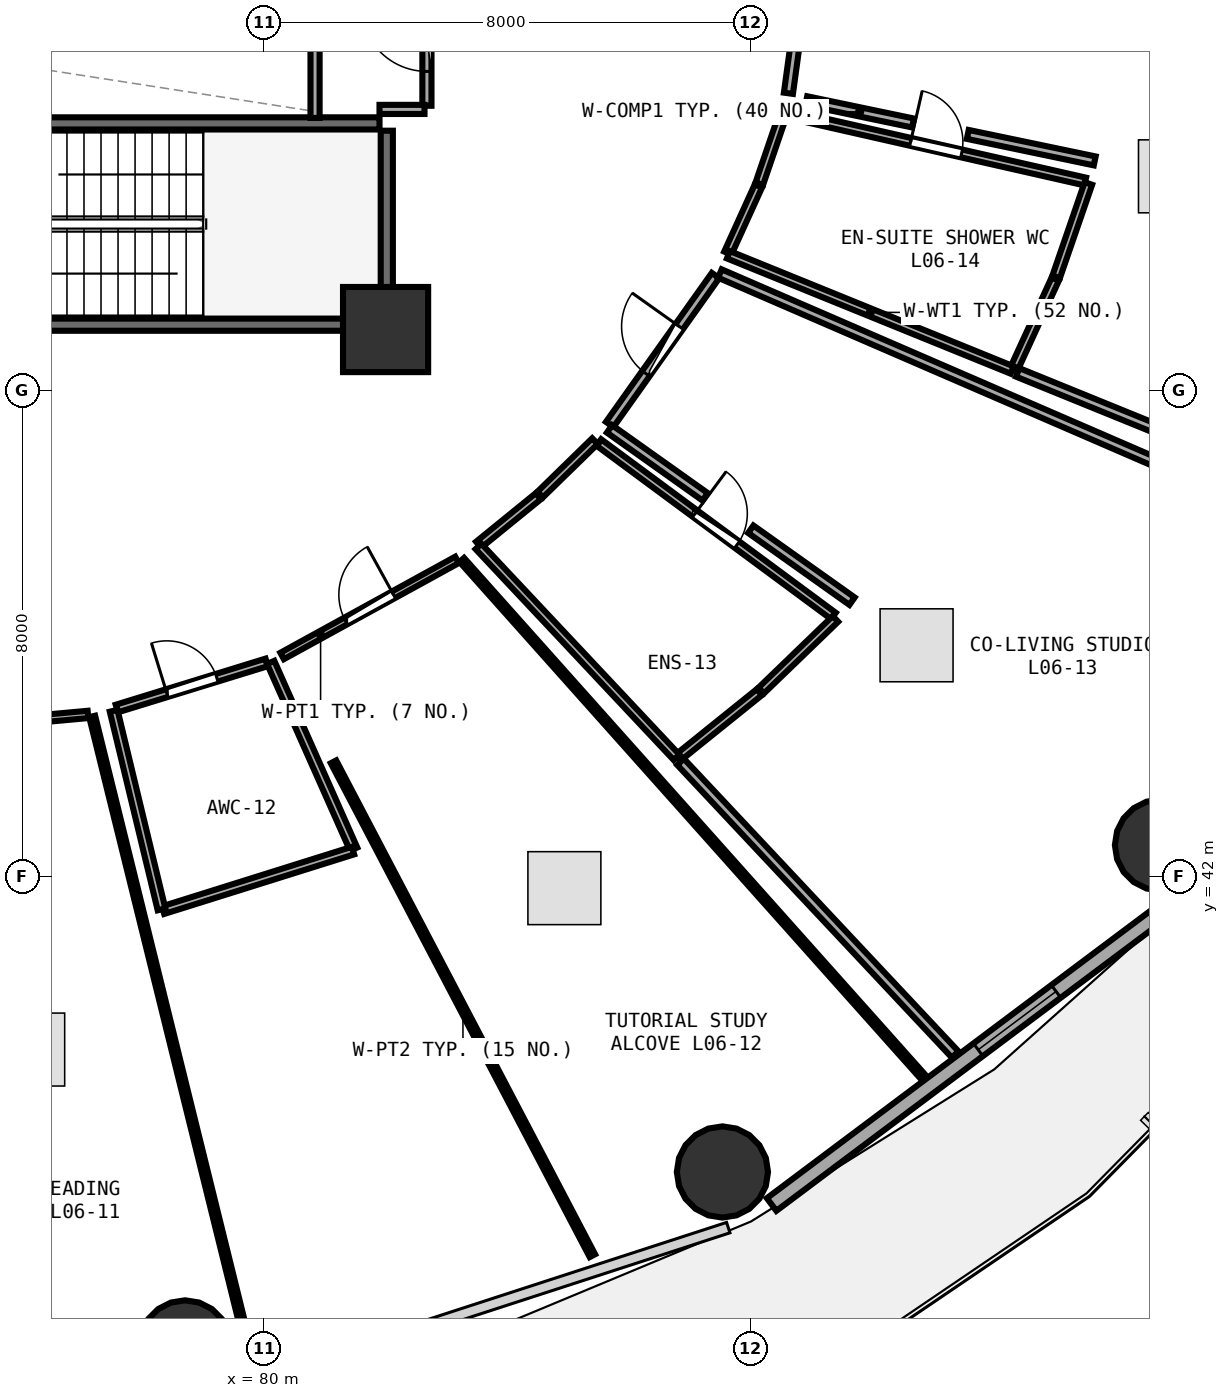
"""IFC4 building model, lengths in metres.
Left out: names, types, materials, properties, quantities, classifications, styles, units other than length and angle.
Written with IfcOpenShell. Run it as: python <this file> out.ifc"""

import sys

from ifc_helpers import new_model, si_unit, direction, frame, frame_2d, origin, origin_2d, place, context, subcontext, project, spatial, rectangle, circle, extrude, element, fill, save


model = new_model("IFC4")
c1 = context("Model", 3, precision=1e-05, world=origin(), true_north=direction((0.0, 1.0)))
c2 = subcontext(c1, "Body", "Model", "MODEL_VIEW")
j1 = project(units=[si_unit("LENGTHUNIT", "METRE"), si_unit("PLANEANGLEUNIT", "RADIAN")], contexts=[c1])
p1 = place(None, origin())
s1 = spatial("IfcSite", under=j1, at=p1, CompositionType="ELEMENT")
p2 = place(p1, origin())
s2 = spatial("IfcBuilding", under=s1, at=p2, CompositionType="ELEMENT")
p3 = place(p2, frame((0.0, 0.0, 26.25)))
s3 = spatial("IfcBuildingStorey", under=s2, at=p3, CompositionType="ELEMENT", Elevation=26.25)
p4 = place(p3, frame((82.0, 51.0, 0.0), z_axis=(0.0, 0.0, 1.0), x_axis=(1.0, 0.0, 0.0)))
e1 = element("IfcColumn", 1, at=p4, inside=s3, PredefinedType="PILASTER", context=c2, shape_type="SweptSolid", body=[
    extrude(rectangle(XDim=1.4, YDim=1.4, at=origin_2d()), origin(), (0.0, 0.0, 1.0), 3.75),
])
for number, where, z_axis, x_axis in (
    (2, (78.702, 34.286, 0.0), (0.0, 0.0, 1.0), (1.0, 0.0, 0.0)),
    (3, (87.54, 37.146, 0.0), (0.0, 0.0, 1.0), (1.0, 0.0, 0.0)),
    (4, (94.744, 42.522, 0.0), (0.0, 0.0, 1.0), (1.0, 0.0, 0.0)),
):
    element("IfcColumn", number, at=place(p3, frame(where, z_axis=z_axis, x_axis=x_axis)), inside=s3, PredefinedType="COLUMN", context=c2, shape_type="SweptSolid", body=[
        extrude(circle(Radius=0.75, at=origin_2d()), origin(), (0.0, 0.0, 1.0), 3.75),
    ])
p5 = place(p3, frame((88.349, 36.611, 0.0), z_axis=(0.0, 0.0, 1.0), x_axis=(0.80030733173, 0.599590005569, 0.0)))
e5 = element("IfcWall", 5, at=p5, inside=s3, PredefinedType="SOLIDWALL", context=c2, shape_type="SweptSolid", body=[
    extrude(rectangle(XDim=8.291, YDim=0.26, at=frame_2d((4.145, 0.0))), origin(), (0.0, 0.0, 1.0), 3.475),
])
p6 = place(p5, frame((4.245, 0.0, 0.85)))
e6 = element("IfcOpeningElement", 6, at=p6, cuts=e5, PredefinedType="OPENING", context=c2, shape_type="SweptSolid", body=[
    extrude(rectangle(XDim=1.6, YDim=1.45, at=frame_2d((0.8, 0.725))), frame((0.0, 0.14, 0.0), z_axis=(0.0, -1.0, 0.0), x_axis=(1.0, 0.0, 0.0)), (0.0, 0.0, 1.0), 0.28),
])
p7 = place(p3, frame((74.0, 51.08, 0.0), z_axis=(0.0, 0.0, 1.0), x_axis=(1.0, 0.0, 0.0)))
e7 = element("IfcWall", 7, at=p7, inside=s3, PredefinedType="SHEAR", context=c2, shape_type="SweptSolid", body=[
    extrude(rectangle(XDim=7.9, YDim=0.2, at=frame_2d((3.95, 0.0))), origin(), (0.0, 0.0, 1.0), 3.49),
])
p8 = place(p7, frame((1.12, 0.0, 0.0)))
e8 = element("IfcOpeningElement", 8, at=p8, cuts=e7, PredefinedType="OPENING", context=c2, shape_type="SweptSolid", body=[
    extrude(rectangle(XDim=1.05, YDim=2.1, at=frame_2d((0.525, 1.05))), frame((0.0, 0.11, 0.0), z_axis=(0.0, -1.0, 0.0), x_axis=(1.0, 0.0, 0.0)), (0.0, 0.0, 1.0), 0.22),
])
p9 = place(p3, frame((82.02, 51.2, 0.0), z_axis=(0.0, 0.0, 1.0), x_axis=(0.0, 1.0, 0.0)))
e9 = element("IfcWall", 9, at=p9, inside=s3, PredefinedType="SHEAR", context=c2, shape_type="SweptSolid", body=[
    extrude(rectangle(XDim=3.07, YDim=0.2, at=frame_2d((1.535, 0.0))), origin(), (0.0, 0.0, 1.0), 3.49),
])
p10 = place(p3, frame((81.9, 54.39, 0.0), z_axis=(0.0, 0.0, 1.0), x_axis=(-1.0, 0.0, 0.0)))
e10 = element("IfcWall", 10, at=p10, inside=s3, PredefinedType="SHEAR", context=c2, shape_type="SweptSolid", body=[
    extrude(rectangle(XDim=8.46, YDim=0.2, at=frame_2d((4.23, 0.0))), origin(), (0.0, 0.0, 1.0), 3.49),
])
p11 = place(p3, frame((80.84, 54.48, 0.0), z_axis=(0.0, 0.0, 1.0), x_axis=(0.0, 1.0, 0.0)))
e11 = element("IfcWall", 11, at=p11, inside=s3, PredefinedType="PARTITIONING", context=c2, shape_type="SweptSolid", body=[
    extrude(rectangle(XDim=2.29, YDim=0.15, at=frame_2d((1.145, 0.0))), origin(), (0.0, 0.0, 1.0), 3.48),
])
p12 = place(p3, frame((82.68, 54.68, 0.0), z_axis=(0.0, 0.0, 1.0), x_axis=(0.0, 1.0, 0.0)))
e12 = element("IfcWall", 12, at=p12, inside=s3, PredefinedType="PARTITIONING", context=c2, shape_type="SweptSolid", body=[
    extrude(rectangle(XDim=2.21, YDim=0.15, at=frame_2d((1.105, 0.0))), origin(), (0.0, 0.0, 1.0), 3.48),
])
p13 = place(p12, frame((0.565, 0.0, 0.0)))
e13 = element("IfcOpeningElement", 13, at=p13, cuts=e12, PredefinedType="OPENING", context=c2, shape_type="SweptSolid", body=[
    extrude(rectangle(XDim=1.08, YDim=2.1, at=frame_2d((0.54, 1.05))), frame((0.0, 0.085, 0.0), z_axis=(0.0, -1.0, 0.0), x_axis=(1.0, 0.0, 0.0)), (0.0, 0.0, 1.0), 0.17),
])
p14 = place(p3, frame((73.897, 44.376, 0.0), z_axis=(0.0, 0.0, 1.0), x_axis=(0.995829610124, 0.091232601628, 0.0)))
e14 = element("IfcWall", 14, at=p14, inside=s3, PredefinedType="PARTITIONING", context=c2, shape_type="SweptSolid", body=[
    extrude(rectangle(XDim=3.222, YDim=0.12, at=frame_2d((1.611, 0.0))), origin(), (0.0, 0.0, 1.0), 3.235),
])
p15 = place(p14, frame((1.161, 0.0, 0.0)))
e15 = element("IfcOpeningElement", 15, at=p15, cuts=e14, PredefinedType="OPENING", context=c2, shape_type="SweptSolid", body=[
    extrude(rectangle(XDim=0.9, YDim=2.08, at=frame_2d((0.45, 1.04))), frame((0.0, 0.07, 0.0), z_axis=(0.0, -1.0, 0.0), x_axis=(1.0, 0.0, 0.0)), (0.0, 0.0, 1.0), 0.14),
])
p16 = place(p3, frame((77.58, 44.768, 0.0), z_axis=(0.0, 0.0, 1.0), x_axis=(0.955754448098, 0.294165659011, 0.0)))
e16 = element("IfcWall", 16, at=p16, inside=s3, PredefinedType="PLUMBINGWALL", context=c2, shape_type="SweptSolid", body=[
    extrude(rectangle(XDim=2.579, YDim=0.13, at=frame_2d((1.29, 0.0))), origin(), (0.0, 0.0, 1.0), 3.235),
])
p17 = place(p16, frame((0.86, 0.0, 0.0)))
e17 = element("IfcOpeningElement", 17, at=p17, cuts=e16, PredefinedType="OPENING", context=c2, shape_type="SweptSolid", body=[
    extrude(rectangle(XDim=0.86, YDim=2.05, at=frame_2d((0.43, 1.025))), frame((0.0, 0.075, 0.0), z_axis=(0.0, -1.0, 0.0), x_axis=(1.0, 0.0, 0.0)), (0.0, 0.0, 1.0), 0.15),
])
p18 = place(p3, frame((80.299, 45.632, 0.0), z_axis=(0.0, 0.0, 1.0), x_axis=(0.876387079092, 0.481607399861, 0.0)))
e18 = element("IfcWall", 18, at=p18, inside=s3, PredefinedType="PARTITIONING", context=c2, shape_type="SweptSolid", body=[
    extrude(rectangle(XDim=3.281, YDim=0.12, at=frame_2d((1.641, 0.0))), origin(), (0.0, 0.0, 1.0), 2.875),
])
p19 = place(p18, frame((1.191, 0.0, 0.0)))
e19 = element("IfcOpeningElement", 19, at=p19, cuts=e18, PredefinedType="OPENING", context=c2, shape_type="SweptSolid", body=[
    extrude(rectangle(XDim=0.9, YDim=2.08, at=frame_2d((0.45, 1.04))), frame((0.0, 0.07, 0.0), z_axis=(0.0, -1.0, 0.0), x_axis=(1.0, 0.0, 0.0)), (0.0, 0.0, 1.0), 0.14),
])
p20 = place(p3, frame((85.506, 49.143, 0.0), z_axis=(0.0, 0.0, 1.0), x_axis=(0.80412644244, -0.594458295063, 0.0)))
e20 = element("IfcWall", 20, at=p20, inside=s3, PredefinedType="PLUMBINGWALL", context=c2, shape_type="SweptSolid", body=[
    extrude(rectangle(XDim=4.799, YDim=0.13, at=frame_2d((2.399, 0.0))), origin(), (0.0, 0.0, 1.0), 2.875),
])
p21 = place(p20, frame((1.969, 0.0, 0.0)))
e21 = element("IfcOpeningElement", 21, at=p21, cuts=e20, PredefinedType="OPENING", context=c2, shape_type="SweptSolid", body=[
    extrude(rectangle(XDim=0.86, YDim=2.05, at=frame_2d((0.43, 1.025))), frame((0.0, 0.075, 0.0), z_axis=(0.0, -1.0, 0.0), x_axis=(1.0, 0.0, 0.0)), (0.0, 0.0, 1.0), 0.15),
])
p22 = place(p3, frame((85.686, 49.438, 0.0), z_axis=(0.0, 0.0, 1.0), x_axis=(0.579107689823, 0.815251055557, 0.0)))
e22 = element("IfcWall", 22, at=p22, inside=s3, PredefinedType="PARTITIONING", context=c2, shape_type="SweptSolid", body=[
    extrude(rectangle(XDim=3.005, YDim=0.15, at=frame_2d((1.503, 0.0))), origin(), (0.0, 0.0, 1.0), 2.875),
])
p23 = place(p22, frame((1.028, 0.0, 0.0)))
e23 = element("IfcOpeningElement", 23, at=p23, cuts=e22, PredefinedType="OPENING", context=c2, shape_type="SweptSolid", body=[
    extrude(rectangle(XDim=0.95, YDim=2.08, at=frame_2d((0.475, 1.04))), frame((0.0, 0.085, 0.0), z_axis=(0.0, -1.0, 0.0), x_axis=(1.0, 0.0, 0.0)), (0.0, 0.0, 1.0), 0.17),
])
p24 = place(p3, frame((88.603, 54.548, 0.0), z_axis=(0.0, 0.0, 1.0), x_axis=(0.975187669184, -0.221379786503, 0.0)))
e24 = element("IfcWall", 24, at=p24, inside=s3, PredefinedType="PLUMBINGWALL", context=c2, shape_type="SweptSolid", body=[
    extrude(rectangle(XDim=5.029, YDim=0.13, at=frame_2d((2.514, 0.0))), origin(), (0.0, 0.0, 1.0), 3.175),
])
p25 = place(p24, frame((2.084, 0.0, 0.0)))
e25 = element("IfcOpeningElement", 25, at=p25, cuts=e24, PredefinedType="OPENING", context=c2, shape_type="SweptSolid", body=[
    extrude(rectangle(XDim=0.86, YDim=2.05, at=frame_2d((0.43, 1.025))), frame((0.0, 0.075, 0.0), z_axis=(0.0, -1.0, 0.0), x_axis=(1.0, 0.0, 0.0)), (0.0, 0.0, 1.0), 0.15),
])
p26 = place(p3, frame((88.625, 54.885, 0.0), z_axis=(0.0, 0.0, 1.0), x_axis=(0.135838186105, 0.990731036758, 0.0)))
e26 = element("IfcWall", 26, at=p26, inside=s3, PredefinedType="PARTITIONING", context=c2, shape_type="SweptSolid", body=[
    extrude(rectangle(XDim=2.915, YDim=0.15, at=frame_2d((1.458, 0.0))), origin(), (0.0, 0.0, 1.0), 3.48),
])
p27 = place(p26, frame((0.983, 0.0, 0.0)))
e27 = element("IfcOpeningElement", 27, at=p27, cuts=e26, PredefinedType="OPENING", context=c2, shape_type="SweptSolid", body=[
    extrude(rectangle(XDim=0.95, YDim=2.08, at=frame_2d((0.475, 1.04))), frame((0.0, 0.085, 0.0), z_axis=(0.0, -1.0, 0.0), x_axis=(1.0, 0.0, 0.0)), (0.0, 0.0, 1.0), 0.17),
])
p28 = place(p3, frame((81.9, 54.62, 0.0), z_axis=(0.0, 0.0, 1.0), x_axis=(1.0, 0.0, 0.0)))
e28 = element("IfcWall", 28, at=p28, inside=s3, PredefinedType="PARTITIONING", context=c2, shape_type="SweptSolid", body=[
    extrude(rectangle(XDim=0.74, YDim=0.15, at=frame_2d((0.37, 0.0))), origin(), (0.0, 0.0, 1.0), 2.775),
])
p29 = place(p3, frame((77.175, 44.637, 0.0), z_axis=(0.0, 0.0, 1.0), x_axis=(0.239971369295, -0.970779965759, 0.0)))
e29 = element("IfcWall", 29, at=p29, inside=s3, PredefinedType="PARTITIONING", context=c2, shape_type="SweptSolid", body=[
    extrude(rectangle(XDim=10.846, YDim=0.1, at=frame_2d((5.423, 0.0))), origin(), (0.0, 0.0, 1.0), 2.875),
])
p30 = place(p3, frame((80.111, 45.526, 0.0), z_axis=(0.0, 0.0, 1.0), x_axis=(0.405936178007, -0.913901427608, 0.0)))
e30 = element("IfcWall", 30, at=p30, inside=s3, PredefinedType="PLUMBINGWALL", context=c2, shape_type="SweptSolid", body=[
    extrude(rectangle(XDim=3.36, YDim=0.13, at=frame_2d((1.68, 0.0))), origin(), (0.0, 0.0, 1.0), 2.875),
])
p31 = place(p3, frame((81.464, 42.431, 0.0), z_axis=(0.0, 0.0, 1.0), x_axis=(-0.954175708416, -0.299246917226, 0.0)))
e31 = element("IfcWall", 31, at=p31, inside=s3, PredefinedType="PLUMBINGWALL", context=c2, shape_type="SweptSolid", body=[
    extrude(rectangle(XDim=3.275, YDim=0.13, at=frame_2d((1.637, 0.0))), origin(), (0.0, 0.0, 1.0), 2.875),
])
p32 = place(p3, frame((78.315, 41.464, 0.0), z_axis=(0.0, 0.0, 1.0), x_axis=(-0.234406131581, 0.972138758345, 0.0)))
e32 = element("IfcWall", 32, at=p32, inside=s3, PredefinedType="PLUMBINGWALL", context=c2, shape_type="SweptSolid", body=[
    extrude(rectangle(XDim=3.36, YDim=0.13, at=frame_2d((1.68, 0.0))), origin(), (0.0, 0.0, 1.0), 3.235),
])
p33 = place(p3, frame((83.254, 47.211, 0.0), z_axis=(0.0, 0.0, 1.0), x_axis=(0.66580890104, -0.746122313897, 0.0)))
e33 = element("IfcWall", 33, at=p33, inside=s3, PredefinedType="PARTITIONING", context=c2, shape_type="SweptSolid", body=[
    extrude(rectangle(XDim=11.399, YDim=0.1, at=frame_2d((5.7, 0.0))), origin(), (0.0, 0.0, 1.0), 2.875),
])
p34 = place(p3, frame((85.401, 35.769, 0.0), z_axis=(0.0, 0.0, 1.0), x_axis=(-0.464308397246, 0.885673592384, 0.0)))
e34 = element("IfcWall", 34, at=p34, inside=s3, PredefinedType="PARTITIONING", context=c2, shape_type="SweptSolid", body=[
    extrude(rectangle(XDim=9.17, YDim=0.1, at=frame_2d((4.585, 0.0))), origin(), (0.0, 0.0, 1.0), 2.875),
])
p35 = place(p3, frame((83.53, 47.461, 0.0), z_axis=(0.0, 0.0, 1.0), x_axis=(0.77596084644, 0.63078107517, 0.0)))
e35 = element("IfcWall", 35, at=p35, inside=s3, PredefinedType="PLUMBINGWALL", context=c2, shape_type="SweptSolid", body=[
    extrude(rectangle(XDim=1.268, YDim=0.13, at=frame_2d((0.634, 0.0))), origin(), (0.0, 0.0, 1.0), 2.875),
])
p36 = place(p3, frame((84.543, 48.287, 0.0), z_axis=(0.0, 0.0, 1.0), x_axis=(0.715980731769, 0.698120041064, 0.0)))
e36 = element("IfcWall", 36, at=p36, inside=s3, PredefinedType="PLUMBINGWALL", context=c2, shape_type="SweptSolid", body=[
    extrude(rectangle(XDim=1.258, YDim=0.13, at=frame_2d((0.629, 0.0))), origin(), (0.0, 0.0, 1.0), 2.875),
])
p37 = place(p3, frame((89.399, 46.241, 0.0), z_axis=(0.0, 0.0, 1.0), x_axis=(-0.719664402118, -0.694322078234, 0.0)))
e37 = element("IfcWall", 37, at=p37, inside=s3, PredefinedType="PLUMBINGWALL", context=c2, shape_type="SweptSolid", body=[
    extrude(rectangle(XDim=1.696, YDim=0.13, at=frame_2d((0.848, 0.0))), origin(), (0.0, 0.0, 1.0), 2.875),
])
p38 = place(p3, frame((88.148, 45.038, 0.0), z_axis=(0.0, 0.0, 1.0), x_axis=(-0.778806140639, -0.627264693174, 0.0)))
e38 = element("IfcWall", 38, at=p38, inside=s3, PredefinedType="PLUMBINGWALL", context=c2, shape_type="SweptSolid", body=[
    extrude(rectangle(XDim=1.713, YDim=0.13, at=frame_2d((0.856, 0.0))), origin(), (0.0, 0.0, 1.0), 3.175),
])
p39 = place(p3, frame((86.785, 43.966, 0.0), z_axis=(0.0, 0.0, 1.0), x_axis=(-0.68469858897, 0.728826345753, 0.0)))
e39 = element("IfcWall", 39, at=p39, inside=s3, PredefinedType="PLUMBINGWALL", context=c2, shape_type="SweptSolid", body=[
    extrude(rectangle(XDim=4.758, YDim=0.13, at=frame_2d((2.379, 0.0))), origin(), (0.0, 0.0, 1.0), 2.875),
])
p40 = place(p3, frame((87.498, 51.921, 0.0), z_axis=(0.0, 0.0, 1.0), x_axis=(0.917695041134, -0.397285554077, 0.0)))
e40 = element("IfcWall", 40, at=p40, inside=s3, PredefinedType="PARTITIONING", context=c2, shape_type="SweptSolid", body=[
    extrude(rectangle(XDim=12.07, YDim=0.15, at=frame_2d((6.035, 0.0))), origin(), (0.0, 0.0, 1.0), 2.875),
])
p41 = place(p3, frame((91.368, 39.078, 0.0), z_axis=(0.0, 0.0, 1.0), x_axis=(-0.684296653493, 0.729203736975, 0.0)))
e41 = element("IfcWall", 41, at=p41, inside=s3, PredefinedType="PARTITIONING", context=c2, shape_type="SweptSolid", body=[
    extrude(rectangle(XDim=6.6, YDim=0.15, at=frame_2d((3.3, 0.0))), origin(), (0.0, 0.0, 1.0), 2.875),
])
p42 = place(p3, frame((89.671, 46.533, 0.0), z_axis=(0.0, 0.0, 1.0), x_axis=(-0.815281399299, 0.579064970411, 0.0)))
e42 = element("IfcWall", 42, at=p42, inside=s3, PredefinedType="PARTITIONING", context=c2, shape_type="SweptSolid", body=[
    extrude(rectangle(XDim=2.042, YDim=0.15, at=frame_2d((1.021, 0.0))), origin(), (0.0, 0.0, 1.0), 3.48),
])
p43 = place(p3, frame((87.256, 48.249, 0.0), z_axis=(0.0, 0.0, 1.0), x_axis=(-0.815270043711, 0.579080957922, 0.0)))
e43 = element("IfcWall", 43, at=p43, inside=s3, PredefinedType="PARTITIONING", context=c2, shape_type="SweptSolid", body=[
    extrude(rectangle(XDim=1.929, YDim=0.15, at=frame_2d((0.964, 0.0))), origin(), (0.0, 0.0, 1.0), 3.235),
])
p44 = place(p3, frame((87.628, 52.255, 0.0), z_axis=(0.0, 0.0, 1.0), x_axis=(0.4138937247, 0.910325208183, 0.0)))
e44 = element("IfcWall", 44, at=p44, inside=s3, PredefinedType="PLUMBINGWALL", context=c2, shape_type="SweptSolid", body=[
    extrude(rectangle(XDim=1.216, YDim=0.13, at=frame_2d((0.608, 0.0))), origin(), (0.0, 0.0, 1.0), 3.48),
])
p45 = place(p3, frame((88.146, 53.399, 0.0), z_axis=(0.0, 0.0, 1.0), x_axis=(0.323735286305, 0.946147696928, 0.0)))
e45 = element("IfcWall", 45, at=p45, inside=s3, PredefinedType="PLUMBINGWALL", context=c2, shape_type="SweptSolid", body=[
    extrude(rectangle(XDim=1.208, YDim=0.13, at=frame_2d((0.604, 0.0))), origin(), (0.0, 0.0, 1.0), 3.48),
])
p46 = place(p3, frame((93.559, 53.402, 0.0), z_axis=(0.0, 0.0, 1.0), x_axis=(-0.326356647952, -0.945246707657, 0.0)))
e46 = element("IfcWall", 46, at=p46, inside=s3, PredefinedType="PLUMBINGWALL", context=c2, shape_type="SweptSolid", body=[
    extrude(rectangle(XDim=1.624, YDim=0.13, at=frame_2d((0.812, 0.0))), origin(), (0.0, 0.0, 1.0), 3.48),
])
p47 = place(p3, frame((93.014, 51.83, 0.0), z_axis=(0.0, 0.0, 1.0), x_axis=(-0.41762687648, -0.908618617486, 0.0)))
e47 = element("IfcWall", 47, at=p47, inside=s3, PredefinedType="PLUMBINGWALL", context=c2, shape_type="SweptSolid", body=[
    extrude(rectangle(XDim=1.634, YDim=0.13, at=frame_2d((0.817, 0.0))), origin(), (0.0, 0.0, 1.0), 2.875),
])
p48 = place(p3, frame((92.304, 50.334, 0.0), z_axis=(0.0, 0.0, 1.0), x_axis=(-0.926504606816, 0.376283421835, 0.0)))
e48 = element("IfcWall", 48, at=p48, inside=s3, PredefinedType="PLUMBINGWALL", context=c2, shape_type="SweptSolid", body=[
    extrude(rectangle(XDim=5.036, YDim=0.13, at=frame_2d((2.518, 0.0))), origin(), (0.0, 0.0, 1.0), 2.875),
])
p49 = place(p3, frame((98.865, 47.664, 0.0), z_axis=(0.0, 0.0, 1.0), x_axis=(-0.926325178802, 0.376724917038, 0.0)))
e49 = element("IfcWall", 49, at=p49, inside=s3, PredefinedType="PARTITIONING", context=c2, shape_type="SweptSolid", body=[
    extrude(rectangle(XDim=6.983, YDim=0.15, at=frame_2d((3.492, 0.0))), origin(), (0.0, 0.0, 1.0), 2.875),
])
p50 = place(p3, frame((93.663, 53.773, 0.0), z_axis=(0.0, 0.0, 1.0), x_axis=(-0.978922282622, 0.204233113343, 0.0)))
e50 = element("IfcWall", 50, at=p50, inside=s3, PredefinedType="PARTITIONING", context=c2, shape_type="SweptSolid", body=[
    extrude(rectangle(XDim=2.133, YDim=0.15, at=frame_2d((1.066, 0.0))), origin(), (0.0, 0.0, 1.0), 3.175),
])
p51 = place(p3, frame((90.675, 54.397, 0.0), z_axis=(0.0, 0.0, 1.0), x_axis=(-0.978929424395, 0.204198878681, 0.0)))
e51 = element("IfcWall", 51, at=p51, inside=s3, PredefinedType="PARTITIONING", context=c2, shape_type="SweptSolid", body=[
    extrude(rectangle(XDim=1.793, YDim=0.15, at=frame_2d((0.897, 0.0))), origin(), (0.0, 0.0, 1.0), 3.235),
])
p52 = place(p6, origin())
e52 = element("IfcWindow", 52, at=p52, inside=s3, PartitioningType="SINGLE_PANEL", PredefinedType="WINDOW", context=c2, shape_type="SweptSolid", body=[
    extrude(rectangle(XDim=1.6, YDim=1.45, at=frame_2d((0.8, 0.725))), frame((0.0, 0.03, 0.0), z_axis=(0.0, -1.0, 0.0), x_axis=(1.0, 0.0, 0.0)), (0.0, 0.0, 1.0), 0.06),
])
fill(e6, e52)
p53 = place(p13, origin())
e53 = element("IfcDoor", 53, at=p53, inside=s3, OperationType="SINGLE_SWING_RIGHT", PredefinedType="DOOR", context=c2, shape_type="SweptSolid", body=[
    extrude(rectangle(XDim=1.08, YDim=2.1, at=frame_2d((0.54, 1.05))), frame((0.0, 0.025, 0.0), z_axis=(0.0, -1.0, 0.0), x_axis=(1.0, 0.0, 0.0)), (0.0, 0.0, 1.0), 0.05),
])
fill(e13, e53)
p54 = place(p17, origin())
e54 = element("IfcDoor", 54, at=p54, inside=s3, OperationType="SINGLE_SWING_LEFT", PredefinedType="DOOR", context=c2, shape_type="SweptSolid", body=[
    extrude(rectangle(XDim=0.86, YDim=2.05, at=frame_2d((0.43, 1.025))), frame((0.0, 0.025, 0.0), z_axis=(0.0, -1.0, 0.0), x_axis=(1.0, 0.0, 0.0)), (0.0, 0.0, 1.0), 0.05),
])
fill(e17, e54)
p55 = place(p19, origin())
e55 = element("IfcDoor", 55, at=p55, inside=s3, OperationType="SINGLE_SWING_RIGHT", PredefinedType="DOOR", context=c2, shape_type="SweptSolid", body=[
    extrude(rectangle(XDim=0.9, YDim=2.08, at=frame_2d((0.45, 1.04))), frame((0.0, 0.025, 0.0), z_axis=(0.0, -1.0, 0.0), x_axis=(1.0, 0.0, 0.0)), (0.0, 0.0, 1.0), 0.05),
])
fill(e19, e55)
p56 = place(p21, origin())
e56 = element("IfcDoor", 56, at=p56, inside=s3, OperationType="SINGLE_SWING_LEFT", PredefinedType="DOOR", context=c2, shape_type="SweptSolid", body=[
    extrude(rectangle(XDim=0.86, YDim=2.05, at=frame_2d((0.43, 1.025))), frame((0.0, 0.025, 0.0), z_axis=(0.0, -1.0, 0.0), x_axis=(1.0, 0.0, 0.0)), (0.0, 0.0, 1.0), 0.05),
])
fill(e21, e56)
p57 = place(p23, origin())
e57 = element("IfcDoor", 57, at=p57, inside=s3, OperationType="SINGLE_SWING_RIGHT", PredefinedType="DOOR", context=c2, shape_type="SweptSolid", body=[
    extrude(rectangle(XDim=0.95, YDim=2.08, at=frame_2d((0.475, 1.04))), frame((0.0, 0.025, 0.0), z_axis=(0.0, -1.0, 0.0), x_axis=(1.0, 0.0, 0.0)), (0.0, 0.0, 1.0), 0.05),
])
fill(e23, e57)
p58 = place(p25, origin())
e58 = element("IfcDoor", 58, at=p58, inside=s3, OperationType="SINGLE_SWING_LEFT", PredefinedType="DOOR", context=c2, shape_type="SweptSolid", body=[
    extrude(rectangle(XDim=0.86, YDim=2.05, at=frame_2d((0.43, 1.025))), frame((0.0, 0.025, 0.0), z_axis=(0.0, -1.0, 0.0), x_axis=(1.0, 0.0, 0.0)), (0.0, 0.0, 1.0), 0.05),
])
fill(e25, e58)
save(model, sys.argv[1])
